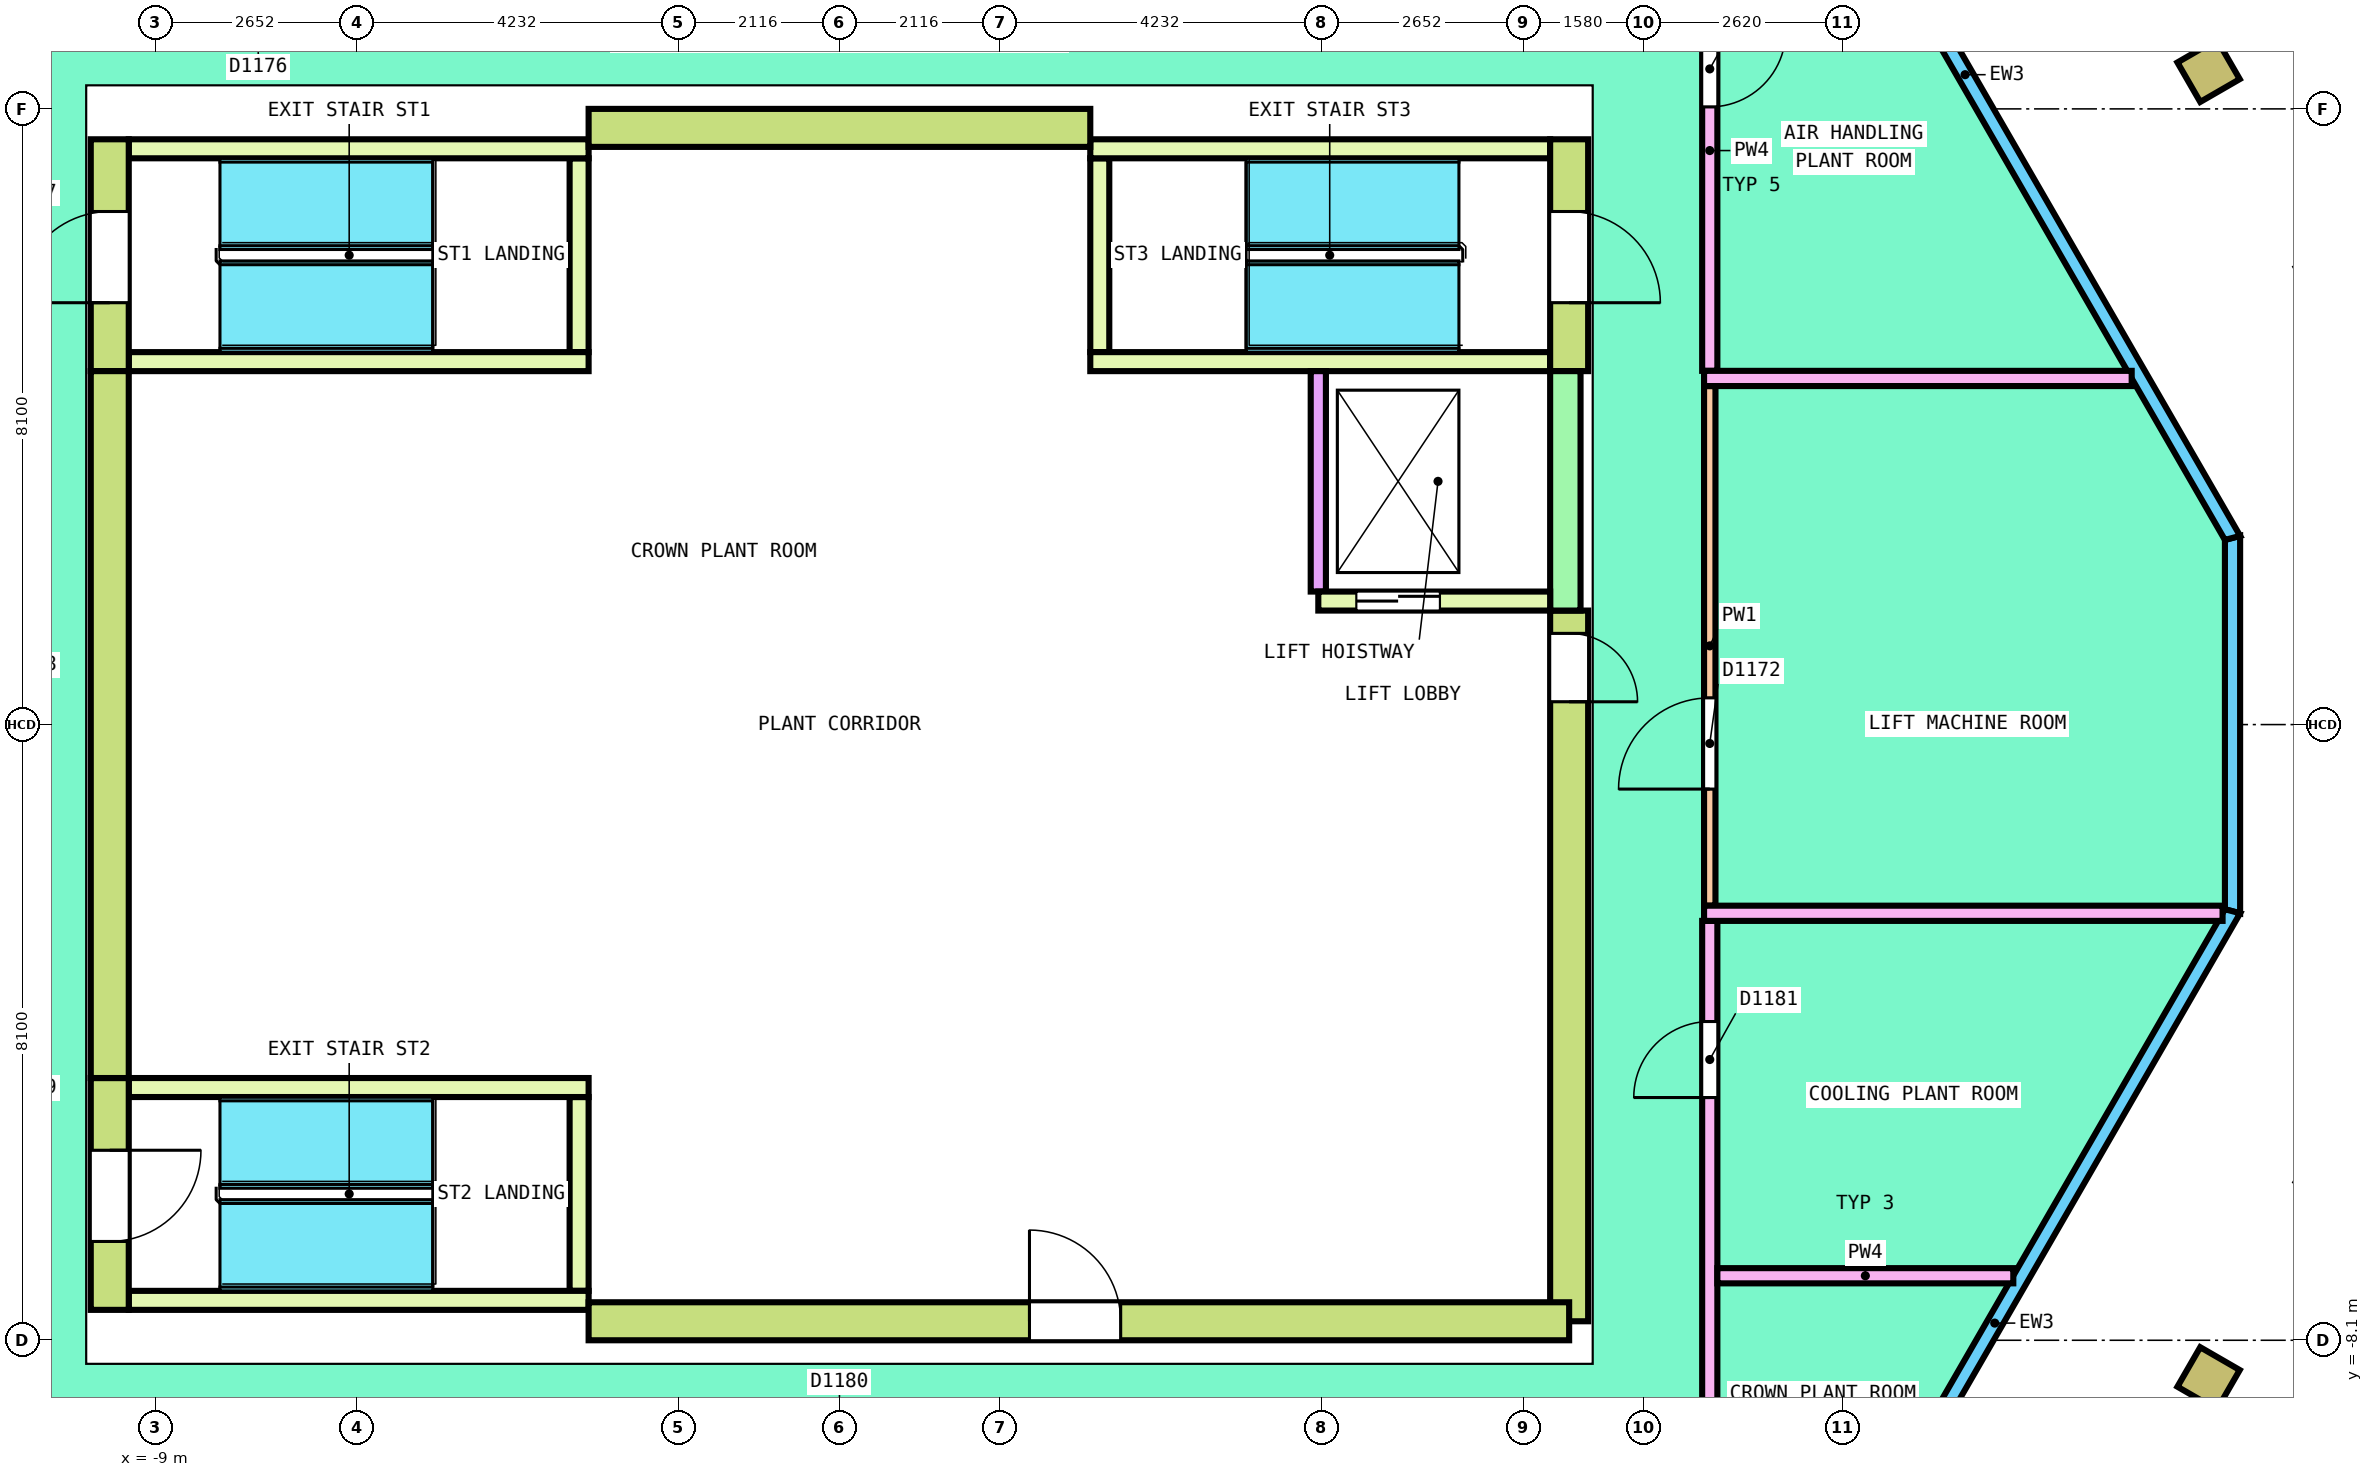
"""IFC4 building model, lengths in metres.
Left out: names, types, materials, properties, quantities, classifications, styles, units other than length and angle.
Written with IfcOpenShell. Run it as: python <this file> out.ifc"""

import sys

from ifc_helpers import new_model, si_unit, direction, frame, frame_2d, origin, origin_2d, place, context, subcontext, project, spatial, polyline, rectangle, hollow_rectangle, outline, extrude, element, fill, save


model = new_model("IFC4")
c1 = context("Model", 3, precision=1e-05, world=origin(), true_north=direction((0.0, 1.0)))
c2 = subcontext(c1, "Body", "Model", "MODEL_VIEW")
j1 = project(units=[si_unit("LENGTHUNIT", "METRE"), si_unit("PLANEANGLEUNIT", "RADIAN")], contexts=[c1])
p1 = place(None, origin())
s1 = spatial("IfcSite", under=j1, at=p1, CompositionType="ELEMENT")
p2 = place(p1, origin())
s2 = spatial("IfcBuilding", under=s1, at=p2, CompositionType="ELEMENT")
p3 = place(p2, frame((0.0, 0.0, 348.6)))
s3 = spatial("IfcBuildingStorey", under=s2, at=p3, CompositionType="ELEMENT", Elevation=348.6)
for number, where, z_axis, x_axis in (
    (1, (18.013, 8.601, 0.0), (0.0, 0.0, 1.0), (-0.5, 0.866, 0.0)),
    (2, (18.013, -8.601, 0.0), (0.0, 0.0, 1.0), (0.5, 0.866, 0.0)),
):
    element("IfcColumn", number, at=place(p3, frame(where, z_axis=z_axis, x_axis=x_axis)), inside=s3, PredefinedType="COLUMN", context=c2, shape_type="SweptSolid", body=[
        extrude(hollow_rectangle(XDim=0.6, YDim=0.6, WallThickness=0.04, InnerFilletRadius=0.04, OuterFilletRadius=0.08, at=origin_2d()), origin(), (0.0, 0.0, 1.0), 4.0),
    ])
p4 = place(p3, frame((18.327, -2.456, 0.0), z_axis=(0.0, 0.0, 1.0), x_axis=(0.0, 1.0, 0.0)))
e3 = element("IfcWall", 3, at=p4, inside=s3, PredefinedType="SOLIDWALL", context=c2, shape_type="SweptSolid", body=[
    extrude(outline(polyline([(-0.027, -0.1), (4.938, -0.1), (4.885, 0.1), (0.027, 0.1), (-0.027, -0.1)])), origin(), (0.0, 0.0, 1.0), 3.8),
])
p5 = place(p3, frame((18.327, 2.456, 0.0), z_axis=(0.0, 0.0, 1.0), x_axis=(-0.499991740577, 0.866030172312, 0.0)))
e4 = element("IfcWall", 4, at=p5, inside=s3, PredefinedType="SOLIDWALL", context=c2, shape_type="SweptSolid", body=[
    extrude(outline(polyline([(-0.027, -0.1), (14.101, -0.1), (14.047, 0.1), (0.027, 0.1), (-0.027, -0.1)])), origin(), (0.0, 0.0, 1.0), 3.8),
])
p6 = place(p3, frame((12.071, -13.292, 0.0), z_axis=(0.0, 0.0, 1.0), x_axis=(0.499996062888, 0.866027676865, 0.0)))
e5 = element("IfcWall", 5, at=p6, inside=s3, PredefinedType="SOLIDWALL", context=c2, shape_type="SweptSolid", body=[
    extrude(outline(polyline([(0.0, -0.1), (12.54, -0.1), (12.486, 0.1), (0.0, 0.1), (0.0, -0.1)])), origin(), (0.0, 0.0, 1.0), 3.8),
])
p7 = place(p3, frame((9.6, -7.85, 0.0), z_axis=(0.0, 0.0, 1.0), x_axis=(0.0, 1.0, 0.0)))
e6 = element("IfcWall", 6, at=p7, inside=s3, PredefinedType="SHEAR", context=c2, shape_type="SweptSolid", body=[
    extrude(rectangle(XDim=9.35, YDim=0.5, at=frame_2d((4.675, 0.0))), origin(), (0.0, 0.0, 1.0), 3.8),
])
p8 = place(p7, frame((8.15, 0.0, 0.0)))
e7 = element("IfcOpeningElement", 7, at=p8, cuts=e6, PredefinedType="OPENING", context=c2, shape_type="SweptSolid", body=[
    extrude(rectangle(XDim=0.9, YDim=2.1, at=frame_2d((0.45, 1.05))), frame((0.0, 0.26, 0.0), z_axis=(0.0, -1.0, 0.0), x_axis=(1.0, 0.0, 0.0)), (0.0, 0.0, 1.0), 0.52),
])
p9 = place(p3, frame((3.3, 7.85, 0.0), z_axis=(0.0, 0.0, 1.0), x_axis=(-1.0, 0.0, 0.0)))
e8 = element("IfcWall", 8, at=p9, inside=s3, PredefinedType="SHEAR", context=c2, shape_type="SweptSolid", body=[
    extrude(rectangle(XDim=6.6, YDim=0.5, at=frame_2d((3.3, 0.0))), origin(), (0.0, 0.0, 1.0), 3.8),
])
p10 = place(p3, frame((-9.6, 4.65, 0.0), z_axis=(0.0, 0.0, 1.0), x_axis=(0.0, -1.0, 0.0)))
e9 = element("IfcWall", 9, at=p10, inside=s3, PredefinedType="SHEAR", context=c2, shape_type="SweptSolid", body=[
    extrude(rectangle(XDim=9.3, YDim=0.5, at=frame_2d((4.65, 0.0))), origin(), (0.0, 0.0, 1.0), 3.8),
])
p11 = place(p3, frame((-3.3, -7.85, 0.0), z_axis=(0.0, 0.0, 1.0), x_axis=(1.0, 0.0, 0.0)))
e10 = element("IfcWall", 10, at=p11, inside=s3, PredefinedType="SHEAR", context=c2, shape_type="SweptSolid", body=[
    extrude(rectangle(XDim=12.9, YDim=0.5, at=frame_2d((6.45, 0.0))), origin(), (0.0, 0.0, 1.0), 3.8),
])
p12 = place(p11, frame((5.8, 0.0, 0.0)))
e11 = element("IfcOpeningElement", 11, at=p12, cuts=e10, PredefinedType="OPENING", context=c2, shape_type="SweptSolid", body=[
    extrude(rectangle(XDim=1.2, YDim=2.1, at=frame_2d((0.6, 1.05))), frame((0.0, 0.26, 0.0), z_axis=(0.0, -1.0, 0.0), x_axis=(1.0, 0.0, 0.0)), (0.0, 0.0, 1.0), 0.52),
])
p13 = place(p3, frame((-9.6, 4.65, 0.0), z_axis=(0.0, 0.0, 1.0), x_axis=(0.0, 1.0, 0.0)))
e12 = element("IfcWall", 12, at=p13, inside=s3, PredefinedType="SHEAR", context=c2, shape_type="SweptSolid", body=[
    extrude(rectangle(XDim=3.05, YDim=0.5, at=frame_2d((1.525, 0.0))), origin(), (0.0, 0.0, 1.0), 3.8),
])
p14 = place(p13, frame((0.9, 0.0, 0.0)))
e13 = element("IfcOpeningElement", 13, at=p14, cuts=e12, PredefinedType="OPENING", context=c2, shape_type="SweptSolid", body=[
    extrude(rectangle(XDim=1.2, YDim=2.1, at=frame_2d((0.6, 1.05))), frame((0.0, 0.26, 0.0), z_axis=(0.0, -1.0, 0.0), x_axis=(1.0, 0.0, 0.0)), (0.0, 0.0, 1.0), 0.52),
])
p15 = place(p3, frame((-3.425, 4.9, 0.0), z_axis=(0.0, 0.0, 1.0), x_axis=(0.0, 1.0, 0.0)))
e14 = element("IfcWall", 14, at=p15, inside=s3, PredefinedType="SOLIDWALL", context=c2, shape_type="SweptSolid", body=[
    extrude(rectangle(XDim=2.55, YDim=0.25, at=frame_2d((1.275, 0.0))), origin(), (0.0, 0.0, 1.0), 3.8),
])
for number, where, z_axis, x_axis in (
    (15, (-9.35, 4.775, 0.0), (0.0, 0.0, 1.0), (1.0, 0.0, 0.0)),
    (16, (-9.35, 7.575, 0.0), (0.0, 0.0, 1.0), (1.0, 0.0, 0.0)),
):
    element("IfcWall", number, at=place(p3, frame(where, z_axis=z_axis, x_axis=x_axis)), inside=s3, PredefinedType="SOLIDWALL", context=c2, shape_type="SweptSolid", body=[
        extrude(rectangle(XDim=6.05, YDim=0.25, at=frame_2d((3.025, 0.0))), origin(), (0.0, 0.0, 1.0), 3.8),
    ])
p16 = place(p3, frame((-9.6, -7.7, 0.0), z_axis=(0.0, 0.0, 1.0), x_axis=(0.0, 1.0, 0.0)))
e17 = element("IfcWall", 17, at=p16, inside=s3, PredefinedType="SHEAR", context=c2, shape_type="SweptSolid", body=[
    extrude(rectangle(XDim=3.05, YDim=0.5, at=frame_2d((1.525, 0.0))), origin(), (0.0, 0.0, 1.0), 3.8),
])
p17 = place(p16, frame((0.9, 0.0, 0.0)))
e18 = element("IfcOpeningElement", 18, at=p17, cuts=e17, PredefinedType="OPENING", context=c2, shape_type="SweptSolid", body=[
    extrude(rectangle(XDim=1.2, YDim=2.1, at=frame_2d((0.6, 1.05))), frame((0.0, 0.26, 0.0), z_axis=(0.0, -1.0, 0.0), x_axis=(1.0, 0.0, 0.0)), (0.0, 0.0, 1.0), 0.52),
])
p18 = place(p3, frame((-3.425, -7.45, 0.0), z_axis=(0.0, 0.0, 1.0), x_axis=(0.0, 1.0, 0.0)))
e19 = element("IfcWall", 19, at=p18, inside=s3, PredefinedType="SOLIDWALL", context=c2, shape_type="SweptSolid", body=[
    extrude(rectangle(XDim=2.55, YDim=0.25, at=frame_2d((1.275, 0.0))), origin(), (0.0, 0.0, 1.0), 3.8),
])
for number, where, z_axis, x_axis in (
    (20, (-9.35, -7.575, 0.0), (0.0, 0.0, 1.0), (1.0, 0.0, 0.0)),
    (21, (-9.35, -4.775, 0.0), (0.0, 0.0, 1.0), (1.0, 0.0, 0.0)),
):
    element("IfcWall", number, at=place(p3, frame(where, z_axis=z_axis, x_axis=x_axis)), inside=s3, PredefinedType="SOLIDWALL", context=c2, shape_type="SweptSolid", body=[
        extrude(rectangle(XDim=6.05, YDim=0.25, at=frame_2d((3.025, 0.0))), origin(), (0.0, 0.0, 1.0), 3.8),
    ])
p19 = place(p3, frame((9.6, 4.65, 0.0), z_axis=(0.0, 0.0, 1.0), x_axis=(0.0, 1.0, 0.0)))
e22 = element("IfcWall", 22, at=p19, inside=s3, PredefinedType="SHEAR", context=c2, shape_type="SweptSolid", body=[
    extrude(rectangle(XDim=3.05, YDim=0.5, at=frame_2d((1.525, 0.0))), origin(), (0.0, 0.0, 1.0), 3.8),
])
p20 = place(p19, frame((0.9, 0.0, 0.0)))
e23 = element("IfcOpeningElement", 23, at=p20, cuts=e22, PredefinedType="OPENING", context=c2, shape_type="SweptSolid", body=[
    extrude(rectangle(XDim=1.2, YDim=2.1, at=frame_2d((0.6, 1.05))), frame((0.0, 0.26, 0.0), z_axis=(0.0, -1.0, 0.0), x_axis=(1.0, 0.0, 0.0)), (0.0, 0.0, 1.0), 0.52),
])
p21 = place(p3, frame((3.425, 4.9, 0.0), z_axis=(0.0, 0.0, 1.0), x_axis=(0.0, 1.0, 0.0)))
e24 = element("IfcWall", 24, at=p21, inside=s3, PredefinedType="SOLIDWALL", context=c2, shape_type="SweptSolid", body=[
    extrude(rectangle(XDim=2.55, YDim=0.25, at=frame_2d((1.275, 0.0))), origin(), (0.0, 0.0, 1.0), 3.8),
])
for number, where, z_axis, x_axis in (
    (25, (3.3, 4.775, 0.0), (0.0, 0.0, 1.0), (1.0, 0.0, 0.0)),
    (26, (3.3, 7.575, 0.0), (0.0, 0.0, 1.0), (1.0, 0.0, 0.0)),
):
    element("IfcWall", number, at=place(p3, frame(where, z_axis=z_axis, x_axis=x_axis)), inside=s3, PredefinedType="SOLIDWALL", context=c2, shape_type="SweptSolid", body=[
        extrude(rectangle(XDim=6.05, YDim=0.25, at=frame_2d((3.025, 0.0))), origin(), (0.0, 0.0, 1.0), 3.8),
    ])
p22 = place(p3, frame((6.3, 1.625, 0.0), z_axis=(0.0, 0.0, 1.0), x_axis=(1.0, 0.0, 0.0)))
e27 = element("IfcWall", 27, at=p22, inside=s3, PredefinedType="SOLIDWALL", context=c2, shape_type="SweptSolid", body=[
    extrude(rectangle(XDim=3.05, YDim=0.25, at=frame_2d((1.525, 0.0))), origin(), (0.0, 0.0, 1.0), 3.8),
])
p23 = place(p22, frame((0.5, 0.0, 0.0)))
e28 = element("IfcOpeningElement", 28, at=p23, cuts=e27, PredefinedType="OPENING", context=c2, shape_type="SweptSolid", body=[
    extrude(rectangle(XDim=1.1, YDim=2.1, at=frame_2d((0.55, 1.05))), frame((0.0, 0.135, 0.0), z_axis=(0.0, -1.0, 0.0), x_axis=(1.0, 0.0, 0.0)), (0.0, 0.0, 1.0), 0.27),
])
p24 = place(p3, frame((6.3, 1.75, 0.0), z_axis=(0.0, 0.0, 1.0), x_axis=(0.0, 1.0, 0.0)))
e29 = element("IfcWall", 29, at=p24, inside=s3, PredefinedType="SOLIDWALL", context=c2, shape_type="SweptSolid", body=[
    extrude(rectangle(XDim=2.9, YDim=0.2, at=frame_2d((1.45, 0.0))), origin(), (0.0, 0.0, 1.0), 3.8),
])
p25 = place(p3, frame((9.55, 1.5, 0.0), z_axis=(0.0, 0.0, 1.0), x_axis=(0.0, 1.0, 0.0)))
e30 = element("IfcWall", 30, at=p25, inside=s3, PredefinedType="SHEAR", context=c2, shape_type="SweptSolid", body=[
    extrude(rectangle(XDim=3.15, YDim=0.4, at=frame_2d((1.575, 0.0))), origin(), (0.0, 0.0, 1.0), 3.8),
])
p26 = place(p3, frame((11.45, -2.383, 0.0), z_axis=(0.0, 0.0, 1.0), x_axis=(0.0, 1.0, 0.0)))
e31 = element("IfcWall", 31, at=p26, inside=s3, PredefinedType="PARTITIONING", context=c2, shape_type="SweptSolid", body=[
    extrude(rectangle(XDim=6.836, YDim=0.15, at=frame_2d((3.418, 0.0))), origin(), (0.0, 0.0, 1.0), 3.3),
])
p27 = place(p26, frame((1.534, 0.0, 0.0)))
e32 = element("IfcOpeningElement", 32, at=p27, cuts=e31, PredefinedType="OPENING", context=c2, shape_type="SweptSolid", body=[
    extrude(rectangle(XDim=1.2, YDim=2.1, at=frame_2d((0.6, 1.05))), frame((0.0, 0.085, 0.0), z_axis=(0.0, -1.0, 0.0), x_axis=(1.0, 0.0, 0.0)), (0.0, 0.0, 1.0), 0.17),
])
p28 = place(p3, frame((11.45, -10.45, 0.0), z_axis=(0.0, 0.0, 1.0), x_axis=(0.0, 1.0, 0.0)))
e33 = element("IfcWall", 33, at=p28, inside=s3, PredefinedType="PARTITIONING", context=c2, shape_type="SweptSolid", body=[
    extrude(rectangle(XDim=7.867, YDim=0.2, at=frame_2d((3.934, 0.0))), origin(), (0.0, 0.0, 1.0), 3.3),
])
p29 = place(p28, frame((5.543, 0.0, 0.0)))
e34 = element("IfcOpeningElement", 34, at=p29, cuts=e33, PredefinedType="OPENING", context=c2, shape_type="SweptSolid", body=[
    extrude(rectangle(XDim=1.0, YDim=2.1, at=frame_2d((0.5, 1.05))), frame((0.0, 0.11, 0.0), z_axis=(0.0, -1.0, 0.0), x_axis=(1.0, 0.0, 0.0)), (0.0, 0.0, 1.0), 0.22),
])
p30 = place(p3, frame((11.45, 4.654, 0.0), z_axis=(0.0, 0.0, 1.0), x_axis=(0.0, 1.0, 0.0)))
e35 = element("IfcWall", 35, at=p30, inside=s3, PredefinedType="PARTITIONING", context=c2, shape_type="SweptSolid", body=[
    extrude(rectangle(XDim=5.796, YDim=0.2, at=frame_2d((2.898, 0.0))), origin(), (0.0, 0.0, 1.0), 3.3),
])
p31 = place(p30, frame((3.472, 0.0, 0.0)))
e36 = element("IfcOpeningElement", 36, at=p31, cuts=e35, PredefinedType="OPENING", context=c2, shape_type="SweptSolid", body=[
    extrude(rectangle(XDim=1.0, YDim=2.1, at=frame_2d((0.5, 1.05))), frame((0.0, 0.11, 0.0), z_axis=(0.0, -1.0, 0.0), x_axis=(1.0, 0.0, 0.0)), (0.0, 0.0, 1.0), 0.22),
])
p32 = place(p3, frame((11.375, 4.554, 0.0), z_axis=(0.0, 0.0, 1.0), x_axis=(1.0, 0.0, 0.0)))
e37 = element("IfcWall", 37, at=p32, inside=s3, PredefinedType="PARTITIONING", context=c2, shape_type="SweptSolid", body=[
    extrude(rectangle(XDim=5.626, YDim=0.2, at=frame_2d((2.813, 0.0))), origin(), (0.0, 0.0, 1.0), 3.3),
])
p33 = place(p3, frame((11.375, -2.483, 0.0), z_axis=(0.0, 0.0, 1.0), x_axis=(1.0, 0.0, 0.0)))
e38 = element("IfcWall", 38, at=p33, inside=s3, PredefinedType="PARTITIONING", context=c2, shape_type="SweptSolid", body=[
    extrude(rectangle(XDim=6.822, YDim=0.2, at=frame_2d((3.411, 0.0))), origin(), (0.0, 0.0, 1.0), 3.3),
])
p34 = place(p3, frame((11.55, -7.251, 0.0), z_axis=(0.0, 0.0, 1.0), x_axis=(1.0, 0.0, 0.0)))
e39 = element("IfcWall", 39, at=p34, inside=s3, PredefinedType="PARTITIONING", context=c2, shape_type="SweptSolid", body=[
    extrude(rectangle(XDim=3.893, YDim=0.2, at=frame_2d((1.947, 0.0))), origin(), (0.0, 0.0, 1.0), 3.3),
])
p35 = place(p14, origin())
e40 = element("IfcDoor", 40, at=p35, inside=s3, OperationType="SINGLE_SWING_RIGHT", PredefinedType="DOOR", context=c2, shape_type="SweptSolid", body=[
    extrude(rectangle(XDim=1.2, YDim=2.1, at=frame_2d((0.6, 1.05))), frame((0.0, 0.2, 0.0), z_axis=(0.0, -1.0, 0.0), x_axis=(1.0, 0.0, 0.0)), (0.0, 0.0, 1.0), 0.4),
])
fill(e13, e40)
p36 = place(p17, origin())
e41 = element("IfcDoor", 41, at=p36, inside=s3, OperationType="SINGLE_SWING_LEFT", PredefinedType="DOOR", context=c2, shape_type="SweptSolid", body=[
    extrude(rectangle(XDim=1.2, YDim=2.1, at=frame_2d((0.6, 1.05))), frame((0.0, 0.2, 0.0), z_axis=(0.0, -1.0, 0.0), x_axis=(1.0, 0.0, 0.0)), (0.0, 0.0, 1.0), 0.4),
])
fill(e18, e41)
p37 = place(p20, origin())
e42 = element("IfcDoor", 42, at=p37, inside=s3, OperationType="SINGLE_SWING_RIGHT", PredefinedType="DOOR", context=c2, shape_type="SweptSolid", body=[
    extrude(rectangle(XDim=1.2, YDim=2.1, at=frame_2d((0.6, 1.05))), frame((0.0, 0.2, 0.0), z_axis=(0.0, -1.0, 0.0), x_axis=(1.0, 0.0, 0.0)), (0.0, 0.0, 1.0), 0.4),
])
fill(e23, e42)
p38 = place(p23, origin())
e43 = element("IfcDoor", 43, at=p38, inside=s3, OperationType="DOUBLE_DOOR_SLIDING", PredefinedType="DOOR", context=c2, shape_type="SweptSolid", body=[
    extrude(rectangle(XDim=1.1, YDim=2.1, at=frame_2d((0.55, 1.05))), frame((0.0, 0.075, 0.0), z_axis=(0.0, -1.0, 0.0), x_axis=(1.0, 0.0, 0.0)), (0.0, 0.0, 1.0), 0.15),
])
fill(e28, e43)
p39 = place(p8, origin())
e44 = element("IfcDoor", 44, at=p39, inside=s3, OperationType="SINGLE_SWING_RIGHT", PredefinedType="DOOR", context=c2, shape_type="SweptSolid", body=[
    extrude(rectangle(XDim=0.9, YDim=2.1, at=frame_2d((0.45, 1.05))), frame((0.0, 0.2, 0.0), z_axis=(0.0, -1.0, 0.0), x_axis=(1.0, 0.0, 0.0)), (0.0, 0.0, 1.0), 0.4),
])
fill(e7, e44)
p40 = place(p12, origin())
e45 = element("IfcDoor", 45, at=p40, inside=s3, OperationType="SINGLE_SWING_LEFT", PredefinedType="DOOR", context=c2, shape_type="SweptSolid", body=[
    extrude(rectangle(XDim=1.2, YDim=2.1, at=frame_2d((0.6, 1.05))), frame((0.0, 0.2, 0.0), z_axis=(0.0, -1.0, 0.0), x_axis=(1.0, 0.0, 0.0)), (0.0, 0.0, 1.0), 0.4),
])
fill(e11, e45)
p41 = place(p27, origin())
e46 = element("IfcDoor", 46, at=p41, inside=s3, OperationType="DOUBLE_DOOR_SINGLE_SWING", PredefinedType="DOOR", context=c2, shape_type="SweptSolid", body=[
    extrude(rectangle(XDim=1.2, YDim=2.1, at=frame_2d((0.6, 1.05))), frame((0.0, 0.025, 0.0), z_axis=(0.0, -1.0, 0.0), x_axis=(1.0, 0.0, 0.0)), (0.0, 0.0, 1.0), 0.05),
])
fill(e32, e46)
p42 = place(p31, origin())
e47 = element("IfcDoor", 47, at=p42, inside=s3, OperationType="SINGLE_SWING_LEFT", PredefinedType="DOOR", context=c2, shape_type="SweptSolid", body=[
    extrude(rectangle(XDim=1.0, YDim=2.1, at=frame_2d((0.5, 1.05))), frame((0.0, 0.025, 0.0), z_axis=(0.0, -1.0, 0.0), x_axis=(1.0, 0.0, 0.0)), (0.0, 0.0, 1.0), 0.05),
])
fill(e36, e47)
p43 = place(p29, origin())
e48 = element("IfcDoor", 48, at=p43, inside=s3, OperationType="SINGLE_SWING_LEFT", PredefinedType="DOOR", context=c2, shape_type="SweptSolid", body=[
    extrude(rectangle(XDim=1.0, YDim=2.1, at=frame_2d((0.5, 1.05))), frame((0.0, 0.025, 0.0), z_axis=(0.0, -1.0, 0.0), x_axis=(1.0, 0.0, 0.0)), (0.0, 0.0, 1.0), 0.05),
])
fill(e34, e48)
save(model, sys.argv[1])
